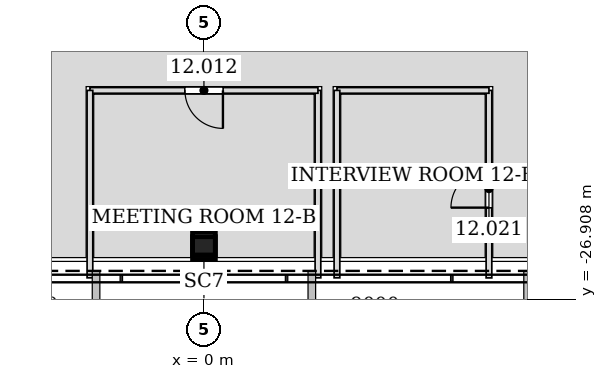
"""IFC4 building model, lengths in metres.
Left out: names, types, materials, properties, quantities, classifications, styles, units other than length and angle.
Written with IfcOpenShell. Run it as: python <this file> out.ifc"""

import sys

from ifc_helpers import new_model, si_unit, direction, frame, frame_2d, origin, origin_2d, place, context, subcontext, project, spatial, rectangle, hollow_rectangle, extrude, element, fill, save


model = new_model("IFC4")
c1 = context("Model", 3, precision=1e-05, world=origin(), true_north=direction((0.0, 1.0)))
c2 = subcontext(c1, "Body", "Model", "MODEL_VIEW")
j1 = project(units=[si_unit("LENGTHUNIT", "METRE"), si_unit("PLANEANGLEUNIT", "RADIAN")], contexts=[c1])
p1 = place(None, origin())
s1 = spatial("IfcSite", under=j1, at=p1, CompositionType="ELEMENT")
p2 = place(p1, origin())
s2 = spatial("IfcBuilding", under=s1, at=p2, CompositionType="ELEMENT")
p3 = place(p2, frame((0.0, 0.0, 58.2)))
s3 = spatial("IfcBuildingStorey", under=s2, at=p3, CompositionType="ELEMENT", Elevation=58.2)
p4 = place(p3, frame((0.0, -25.568, 0.0), z_axis=(0.0, 0.028297679255, 0.99959954049), x_axis=(-1.0, 0.0, 0.0)))
e1 = element("IfcColumn", 1, at=p4, inside=s3, PredefinedType="COLUMN", context=c2, shape_type="SweptSolid", body=[
    extrude(hollow_rectangle(XDim=0.6, YDim=0.6, WallThickness=0.032, at=origin_2d()), origin(), (0.0, 0.0, 1.0), 4.202),
])
p5 = place(p3, frame((3.0, -26.35, 0.0), z_axis=(0.0, 0.0, 1.0), x_axis=(0.0, 1.0, 0.0)))
e2 = element("IfcWall", 2, at=p5, inside=s3, PredefinedType="PARTITIONING", context=c2, shape_type="SweptSolid", body=[
    extrude(rectangle(XDim=4.932, YDim=0.15, at=frame_2d((2.466, 0.0))), origin(), (0.0, 0.0, 1.0), 3.423),
])
p6 = place(p3, frame((3.0, -21.418, 0.0), z_axis=(0.0, 0.0, 1.0), x_axis=(-1.0, 0.0, 0.0)))
e3 = element("IfcWall", 3, at=p6, inside=s3, PredefinedType="PARTITIONING", context=c2, shape_type="SweptSolid", body=[
    extrude(rectangle(XDim=6.0, YDim=0.15, at=frame_2d((3.0, 0.0))), origin(), (0.0, 0.0, 1.0), 2.984),
])
p7 = place(p6, frame((2.5, 0.0, 0.0)))
e4 = element("IfcOpeningElement", 4, at=p7, cuts=e3, PredefinedType="OPENING", context=c2, shape_type="SweptSolid", body=[
    extrude(rectangle(XDim=1.0, YDim=2.1, at=frame_2d((0.5, 1.05))), frame((0.0, 0.085, 0.0), z_axis=(0.0, -1.0, 0.0), x_axis=(1.0, 0.0, 0.0)), (0.0, 0.0, 1.0), 0.17),
])
p8 = place(p3, frame((-3.0, -21.418, 0.0), z_axis=(0.0, 0.0, 1.0), x_axis=(0.0, -1.0, 0.0)))
e5 = element("IfcWall", 5, at=p8, inside=s3, PredefinedType="PARTITIONING", context=c2, shape_type="SweptSolid", body=[
    extrude(rectangle(XDim=4.932, YDim=0.15, at=frame_2d((2.466, 0.0))), origin(), (0.0, 0.0, 1.0), 3.423),
])
p9 = place(p3, frame((7.5, -26.352, 0.0), z_axis=(0.0, 0.0, 1.0), x_axis=(0.0, 1.0, 0.0)))
e6 = element("IfcWall", 6, at=p9, inside=s3, PredefinedType="PARTITIONING", context=c2, shape_type="SweptSolid", body=[
    extrude(rectangle(XDim=4.934, YDim=0.15, at=frame_2d((2.467, 0.0))), origin(), (0.0, 0.0, 1.0), 3.423),
])
p10 = place(p9, frame((1.849, 0.0, 0.0)))
e7 = element("IfcOpeningElement", 7, at=p10, cuts=e6, PredefinedType="OPENING", context=c2, shape_type="SweptSolid", body=[
    extrude(rectangle(XDim=1.0, YDim=2.1, at=frame_2d((0.5, 1.05))), frame((0.0, 0.085, 0.0), z_axis=(0.0, -1.0, 0.0), x_axis=(1.0, 0.0, 0.0)), (0.0, 0.0, 1.0), 0.17),
])
p11 = place(p3, frame((7.5, -21.418, 0.0), z_axis=(0.0, 0.0, 1.0), x_axis=(-1.0, 0.0, 0.0)))
e8 = element("IfcWall", 8, at=p11, inside=s3, PredefinedType="PARTITIONING", context=c2, shape_type="SweptSolid", body=[
    extrude(rectangle(XDim=4.0, YDim=0.15, at=frame_2d((2.0, 0.0))), origin(), (0.0, 0.0, 1.0), 4.035),
])
p12 = place(p3, frame((3.5, -21.418, 0.0), z_axis=(0.0, 0.0, 1.0), x_axis=(0.0, -1.0, 0.0)))
e9 = element("IfcWall", 9, at=p12, inside=s3, PredefinedType="PARTITIONING", context=c2, shape_type="SweptSolid", body=[
    extrude(rectangle(XDim=4.932, YDim=0.15, at=frame_2d((2.466, 0.0))), origin(), (0.0, 0.0, 1.0), 3.423),
])
p13 = place(p7, origin())
e10 = element("IfcDoor", 10, at=p13, inside=s3, OperationType="SINGLE_SWING_LEFT", PredefinedType="DOOR", context=c2, shape_type="SweptSolid", body=[
    extrude(rectangle(XDim=1.0, YDim=2.1, at=frame_2d((0.5, 1.05))), frame((0.0, 0.025, 0.0), z_axis=(0.0, -1.0, 0.0), x_axis=(1.0, 0.0, 0.0)), (0.0, 0.0, 1.0), 0.05),
])
fill(e4, e10)
p14 = place(p10, origin())
e11 = element("IfcDoor", 11, at=p14, inside=s3, OperationType="SINGLE_SWING_LEFT", PredefinedType="DOOR", context=c2, shape_type="SweptSolid", body=[
    extrude(rectangle(XDim=1.0, YDim=2.1, at=frame_2d((0.5, 1.05))), frame((0.0, 0.025, 0.0), z_axis=(0.0, -1.0, 0.0), x_axis=(1.0, 0.0, 0.0)), (0.0, 0.0, 1.0), 0.05),
])
fill(e7, e11)
save(model, sys.argv[1])
